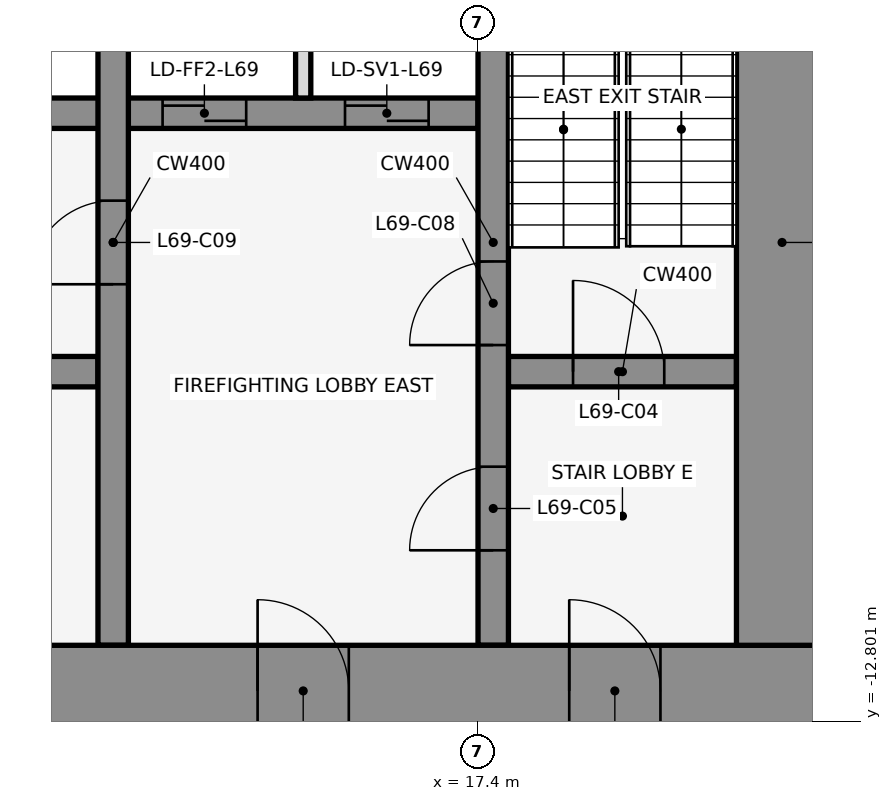
"""IFC4 building model, lengths in metres.
Left out: names, types, materials, properties, quantities, classifications, styles, units other than length and angle.
Written with IfcOpenShell. Run it as: python <this file> out.ifc"""

import sys

from ifc_helpers import new_model, si_unit, direction, frame, frame_2d, origin, place, context, subcontext, project, spatial, rectangle, extrude, element, fill, save


model = new_model("IFC4")
c1 = context("Model", 3, precision=1e-05, world=origin(), true_north=direction((0.0, 1.0)))
c2 = subcontext(c1, "Body", "Model", "MODEL_VIEW")
j1 = project(units=[si_unit("LENGTHUNIT", "METRE"), si_unit("PLANEANGLEUNIT", "RADIAN")], contexts=[c1])
p1 = place(None, origin())
s1 = spatial("IfcSite", under=j1, at=p1, CompositionType="ELEMENT")
p2 = place(p1, origin())
s2 = spatial("IfcBuilding", under=s1, at=p2, CompositionType="ELEMENT")
p3 = place(p2, frame((0.0, 0.0, 306.5)))
s3 = spatial("IfcBuildingStorey", under=s2, at=p3, CompositionType="ELEMENT", Elevation=306.5)
p4 = place(p3, frame((6.4, -8.2, 0.0), z_axis=(0.0, 0.0, 1.0), x_axis=(1.0, 0.0, 0.0)))
e1 = element("IfcWall", 1, at=p4, inside=s3, PredefinedType="SHEAR", context=c2, shape_type="SweptSolid", body=[
    extrude(rectangle(XDim=6.0, YDim=0.4, at=frame_2d((3.0, 0.0))), origin(), (0.0, 0.0, 1.0), 4.5),
])
p5 = place(p4, frame((2.65, 0.0, 0.0)))
e2 = element("IfcOpeningElement", 2, at=p5, cuts=e1, PredefinedType="OPENING", context=c2, shape_type="SweptSolid", body=[
    extrude(rectangle(XDim=0.9, YDim=2.1, at=frame_2d((0.45, 1.05))), frame((0.0, 0.212, 0.0), z_axis=(0.0, -1.0, 0.0), x_axis=(1.0, 0.0, 0.0)), (0.0, 0.0, 1.0), 0.424),
])
p6 = place(p3, frame((17.8, -8.2, 0.0), z_axis=(0.0, 0.0, 1.0), x_axis=(1.0, 0.0, 0.0)))
e3 = element("IfcWall", 3, at=p6, inside=s3, PredefinedType="SHEAR", context=c2, shape_type="SweptSolid", body=[
    extrude(rectangle(XDim=3.0, YDim=0.4, at=frame_2d((1.5, 0.0))), origin(), (0.0, 0.0, 1.0), 4.5),
])
p7 = place(p6, frame((0.85, 0.0, 0.0)))
e4 = element("IfcOpeningElement", 4, at=p7, cuts=e3, PredefinedType="OPENING", context=c2, shape_type="SweptSolid", body=[
    extrude(rectangle(XDim=1.2, YDim=2.1, at=frame_2d((0.6, 1.05))), frame((0.0, 0.212, 0.0), z_axis=(0.0, -1.0, 0.0), x_axis=(1.0, 0.0, 0.0)), (0.0, 0.0, 1.0), 0.424),
])
p8 = place(p3, frame((3.8, -4.8, 0.0), z_axis=(0.0, 0.0, 1.0), x_axis=(1.0, 0.0, 0.0)))
e5 = element("IfcWall", 5, at=p8, inside=s3, PredefinedType="SHEAR", context=c2, shape_type="SweptSolid", body=[
    extrude(rectangle(XDim=13.6, YDim=0.4, at=frame_2d((6.8, 0.0))), origin(), (0.0, 0.0, 1.0), 4.5),
])
p9 = place(p8, frame((0.75, 0.0, 0.0)))
e6 = element("IfcOpeningElement", 6, at=p9, cuts=e5, PredefinedType="OPENING", context=c2, shape_type="SweptSolid", body=[
    extrude(rectangle(XDim=1.2, YDim=2.1, at=frame_2d((0.6, 1.05))), frame((0.0, 0.212, 0.0), z_axis=(0.0, -1.0, 0.0), x_axis=(1.0, 0.0, 0.0)), (0.0, 0.0, 1.0), 0.424),
])
p10 = place(p8, frame((3.65, 0.0, 0.0)))
e7 = element("IfcOpeningElement", 7, at=p10, cuts=e5, PredefinedType="OPENING", context=c2, shape_type="SweptSolid", body=[
    extrude(rectangle(XDim=1.2, YDim=2.1, at=frame_2d((0.6, 1.05))), frame((0.0, 0.212, 0.0), z_axis=(0.0, -1.0, 0.0), x_axis=(1.0, 0.0, 0.0)), (0.0, 0.0, 1.0), 0.424),
])
p11 = place(p8, frame((6.65, 0.0, 0.0)))
e8 = element("IfcOpeningElement", 8, at=p11, cuts=e5, PredefinedType="OPENING", context=c2, shape_type="SweptSolid", body=[
    extrude(rectangle(XDim=1.2, YDim=2.1, at=frame_2d((0.6, 1.05))), frame((0.0, 0.212, 0.0), z_axis=(0.0, -1.0, 0.0), x_axis=(1.0, 0.0, 0.0)), (0.0, 0.0, 1.0), 0.424),
])
p12 = place(p8, frame((9.45, 0.0, 0.0)))
e9 = element("IfcOpeningElement", 9, at=p12, cuts=e5, PredefinedType="OPENING", context=c2, shape_type="SweptSolid", body=[
    extrude(rectangle(XDim=1.1, YDim=2.1, at=frame_2d((0.55, 1.05))), frame((0.0, 0.212, 0.0), z_axis=(0.0, -1.0, 0.0), x_axis=(1.0, 0.0, 0.0)), (0.0, 0.0, 1.0), 0.424),
])
p13 = place(p8, frame((11.85, 0.0, 0.0)))
e10 = element("IfcOpeningElement", 10, at=p13, cuts=e5, PredefinedType="OPENING", context=c2, shape_type="SweptSolid", body=[
    extrude(rectangle(XDim=1.1, YDim=2.1, at=frame_2d((0.55, 1.05))), frame((0.0, 0.212, 0.0), z_axis=(0.0, -1.0, 0.0), x_axis=(1.0, 0.0, 0.0)), (0.0, 0.0, 1.0), 0.424),
])
p14 = place(p3, frame((12.6, -11.8, 0.0), z_axis=(0.0, 0.0, 1.0), x_axis=(0.0, 1.0, 0.0)))
e11 = element("IfcWall", 11, at=p14, inside=s3, PredefinedType="SHEAR", context=c2, shape_type="SweptSolid", body=[
    extrude(rectangle(XDim=10.6, YDim=0.4, at=frame_2d((5.3, 0.0))), origin(), (0.0, 0.0, 1.0), 4.5),
])
p15 = place(p14, frame((4.75, 0.0, 0.0)))
e12 = element("IfcOpeningElement", 12, at=p15, cuts=e11, PredefinedType="OPENING", context=c2, shape_type="SweptSolid", body=[
    extrude(rectangle(XDim=1.1, YDim=2.1, at=frame_2d((0.55, 1.05))), frame((0.0, 0.212, 0.0), z_axis=(0.0, -1.0, 0.0), x_axis=(1.0, 0.0, 0.0)), (0.0, 0.0, 1.0), 0.424),
])
p16 = place(p3, frame((15.1, -4.6, 0.0), z_axis=(0.0, 0.0, 1.0), x_axis=(0.0, 1.0, 0.0)))
e13 = element("IfcWall", 13, at=p16, inside=s3, PredefinedType="PARTITIONING", context=c2, shape_type="SweptSolid", body=[
    extrude(rectangle(XDim=3.4, YDim=0.2, at=frame_2d((1.7, 0.0))), origin(), (0.0, 0.0, 1.0), 3.418),
])
p17 = place(p3, frame((17.6, -11.8, 0.0), z_axis=(0.0, 0.0, 1.0), x_axis=(0.0, 1.0, 0.0)))
e14 = element("IfcWall", 14, at=p17, inside=s3, PredefinedType="SHEAR", context=c2, shape_type="SweptSolid", body=[
    extrude(rectangle(XDim=10.6, YDim=0.4, at=frame_2d((5.3, 0.0))), origin(), (0.0, 0.0, 1.0), 4.5),
])
p18 = place(p17, frame((1.25, 0.0, 0.0)))
e15 = element("IfcOpeningElement", 15, at=p18, cuts=e14, PredefinedType="OPENING", context=c2, shape_type="SweptSolid", body=[
    extrude(rectangle(XDim=1.1, YDim=2.1, at=frame_2d((0.55, 1.05))), frame((0.0, 0.212, 0.0), z_axis=(0.0, -1.0, 0.0), x_axis=(1.0, 0.0, 0.0)), (0.0, 0.0, 1.0), 0.424),
])
p19 = place(p17, frame((3.95, 0.0, 0.0)))
e16 = element("IfcOpeningElement", 16, at=p19, cuts=e14, PredefinedType="OPENING", context=c2, shape_type="SweptSolid", body=[
    extrude(rectangle(XDim=1.1, YDim=2.1, at=frame_2d((0.55, 1.05))), frame((0.0, 0.212, 0.0), z_axis=(0.0, -1.0, 0.0), x_axis=(1.0, 0.0, 0.0)), (0.0, 0.0, 1.0), 0.424),
])
p20 = place(p3, frame((-22.0, -12.4, 0.0), z_axis=(0.0, 0.0, 1.0), x_axis=(1.0, 0.0, 0.0)))
e17 = element("IfcWall", 17, at=p20, inside=s3, PredefinedType="SHEAR", context=c2, shape_type="SweptSolid", body=[
    extrude(rectangle(XDim=44.0, YDim=1.2, at=frame_2d((22.0, 0.0))), origin(), (0.0, 0.0, 1.0), 4.5),
])
p21 = place(p20, frame((2.2, 0.0, 0.0)))
e18 = element("IfcOpeningElement", 18, at=p21, cuts=e17, PredefinedType="OPENING", context=c2, shape_type="SweptSolid", body=[
    extrude(rectangle(XDim=1.2, YDim=2.1, at=frame_2d((0.6, 1.05))), frame((0.0, 0.612, 0.0), z_axis=(0.0, -1.0, 0.0), x_axis=(1.0, 0.0, 0.0)), (0.0, 0.0, 1.0), 1.224),
])
p22 = place(p20, frame((21.4, 0.0, 0.0)))
e19 = element("IfcOpeningElement", 19, at=p22, cuts=e17, PredefinedType="OPENING", context=c2, shape_type="SweptSolid", body=[
    extrude(rectangle(XDim=1.2, YDim=2.1, at=frame_2d((0.6, 1.05))), frame((0.0, 0.612, 0.0), z_axis=(0.0, -1.0, 0.0), x_axis=(1.0, 0.0, 0.0)), (0.0, 0.0, 1.0), 1.224),
])
p23 = place(p20, frame((40.6, 0.0, 0.0)))
e20 = element("IfcOpeningElement", 20, at=p23, cuts=e17, PredefinedType="OPENING", context=c2, shape_type="SweptSolid", body=[
    extrude(rectangle(XDim=1.2, YDim=2.1, at=frame_2d((0.6, 1.05))), frame((0.0, 0.612, 0.0), z_axis=(0.0, -1.0, 0.0), x_axis=(1.0, 0.0, 0.0)), (0.0, 0.0, 1.0), 1.224),
])
p24 = place(p20, frame((16.0, 0.0, 0.0)))
e21 = element("IfcOpeningElement", 21, at=p24, cuts=e17, PredefinedType="OPENING", context=c2, shape_type="SweptSolid", body=[
    extrude(rectangle(XDim=1.8, YDim=2.1, at=frame_2d((0.9, 1.05))), frame((0.0, 0.612, 0.0), z_axis=(0.0, -1.0, 0.0), x_axis=(1.0, 0.0, 0.0)), (0.0, 0.0, 1.0), 1.224),
])
p25 = place(p20, frame((6.3, 0.0, 0.0)))
e22 = element("IfcOpeningElement", 22, at=p25, cuts=e17, PredefinedType="OPENING", context=c2, shape_type="SweptSolid", body=[
    extrude(rectangle(XDim=1.2, YDim=2.1, at=frame_2d((0.6, 1.05))), frame((0.0, 0.612, 0.0), z_axis=(0.0, -1.0, 0.0), x_axis=(1.0, 0.0, 0.0)), (0.0, 0.0, 1.0), 1.224),
])
p26 = place(p20, frame((26.2, 0.0, 0.0)))
e23 = element("IfcOpeningElement", 23, at=p26, cuts=e17, PredefinedType="OPENING", context=c2, shape_type="SweptSolid", body=[
    extrude(rectangle(XDim=1.8, YDim=2.1, at=frame_2d((0.9, 1.05))), frame((0.0, 0.612, 0.0), z_axis=(0.0, -1.0, 0.0), x_axis=(1.0, 0.0, 0.0)), (0.0, 0.0, 1.0), 1.224),
])
p27 = place(p20, frame((36.5, 0.0, 0.0)))
e24 = element("IfcOpeningElement", 24, at=p27, cuts=e17, PredefinedType="OPENING", context=c2, shape_type="SweptSolid", body=[
    extrude(rectangle(XDim=1.2, YDim=2.1, at=frame_2d((0.6, 1.05))), frame((0.0, 0.612, 0.0), z_axis=(0.0, -1.0, 0.0), x_axis=(1.0, 0.0, 0.0)), (0.0, 0.0, 1.0), 1.224),
])
p28 = place(p3, frame((21.4, -11.8, 0.0), z_axis=(0.0, 0.0, 1.0), x_axis=(0.0, 1.0, 0.0)))
e25 = element("IfcWall", 25, at=p28, inside=s3, PredefinedType="SHEAR", context=c2, shape_type="SweptSolid", body=[
    extrude(rectangle(XDim=10.6, YDim=1.2, at=frame_2d((5.3, 0.0))), origin(), (0.0, 0.0, 1.0), 4.5),
])
p29 = place(p7, origin())
e26 = element("IfcDoor", 26, at=p29, inside=s3, OperationType="SINGLE_SWING_RIGHT", PredefinedType="DOOR", context=c2, shape_type="SweptSolid", body=[
    extrude(rectangle(XDim=1.2, YDim=2.1, at=frame_2d((0.6, 1.05))), frame((0.0, 0.025, 0.0), z_axis=(0.0, -1.0, 0.0), x_axis=(1.0, 0.0, 0.0)), (0.0, 0.0, 1.0), 0.05),
])
fill(e4, e26)
p30 = place(p18, origin())
e27 = element("IfcDoor", 27, at=p30, inside=s3, OperationType="SINGLE_SWING_LEFT", PredefinedType="DOOR", context=c2, shape_type="SweptSolid", body=[
    extrude(rectangle(XDim=1.1, YDim=2.1, at=frame_2d((0.55, 1.05))), frame((0.0, 0.025, 0.0), z_axis=(0.0, -1.0, 0.0), x_axis=(1.0, 0.0, 0.0)), (0.0, 0.0, 1.0), 0.05),
])
fill(e15, e27)
p31 = place(p12, origin())
e28 = element("IfcDoor", 28, at=p31, inside=s3, OperationType="DOUBLE_DOOR_SLIDING", PredefinedType="DOOR", context=c2, shape_type="SweptSolid", body=[
    extrude(rectangle(XDim=1.1, YDim=2.1, at=frame_2d((0.55, 1.05))), frame((0.0, 0.025, 0.0), z_axis=(0.0, -1.0, 0.0), x_axis=(1.0, 0.0, 0.0)), (0.0, 0.0, 1.0), 0.05),
])
fill(e9, e28)
p32 = place(p13, origin())
e29 = element("IfcDoor", 29, at=p32, inside=s3, OperationType="DOUBLE_DOOR_SLIDING", PredefinedType="DOOR", context=c2, shape_type="SweptSolid", body=[
    extrude(rectangle(XDim=1.1, YDim=2.1, at=frame_2d((0.55, 1.05))), frame((0.0, 0.025, 0.0), z_axis=(0.0, -1.0, 0.0), x_axis=(1.0, 0.0, 0.0)), (0.0, 0.0, 1.0), 0.05),
])
fill(e10, e29)
p33 = place(p19, origin())
e30 = element("IfcDoor", 30, at=p33, inside=s3, OperationType="SINGLE_SWING_RIGHT", PredefinedType="DOOR", context=c2, shape_type="SweptSolid", body=[
    extrude(rectangle(XDim=1.1, YDim=2.1, at=frame_2d((0.55, 1.05))), frame((0.0, 0.025, 0.0), z_axis=(0.0, -1.0, 0.0), x_axis=(1.0, 0.0, 0.0)), (0.0, 0.0, 1.0), 0.05),
])
fill(e16, e30)
p34 = place(p15, frame((1.1, 0.0, 0.0), z_axis=(0.0, 0.0, 1.0), x_axis=(-1.0, 0.0, 0.0)))
e31 = element("IfcDoor", 31, at=p34, inside=s3, OperationType="SINGLE_SWING_RIGHT", PredefinedType="DOOR", context=c2, shape_type="SweptSolid", body=[
    extrude(rectangle(XDim=1.1, YDim=2.1, at=frame_2d((0.55, 1.05))), frame((0.0, 0.025, 0.0), z_axis=(0.0, -1.0, 0.0), x_axis=(1.0, 0.0, 0.0)), (0.0, 0.0, 1.0), 0.05),
])
fill(e12, e31)
p35 = place(p23, frame((1.2, 0.0, 0.0), z_axis=(0.0, 0.0, 1.0), x_axis=(-1.0, 0.0, 0.0)))
e32 = element("IfcDoor", 32, at=p35, inside=s3, OperationType="SINGLE_SWING_RIGHT", PredefinedType="DOOR", context=c2, shape_type="SweptSolid", body=[
    extrude(rectangle(XDim=1.2, YDim=2.1, at=frame_2d((0.6, 1.05))), frame((0.0, 0.025, 0.0), z_axis=(0.0, -1.0, 0.0), x_axis=(1.0, 0.0, 0.0)), (0.0, 0.0, 1.0), 0.05),
])
fill(e20, e32)
p36 = place(p27, frame((1.2, 0.0, 0.0), z_axis=(0.0, 0.0, 1.0), x_axis=(-1.0, 0.0, 0.0)))
e33 = element("IfcDoor", 33, at=p36, inside=s3, OperationType="SINGLE_SWING_RIGHT", PredefinedType="DOOR", context=c2, shape_type="SweptSolid", body=[
    extrude(rectangle(XDim=1.2, YDim=2.1, at=frame_2d((0.6, 1.05))), frame((0.0, 0.025, 0.0), z_axis=(0.0, -1.0, 0.0), x_axis=(1.0, 0.0, 0.0)), (0.0, 0.0, 1.0), 0.05),
])
fill(e24, e33)
save(model, sys.argv[1])
